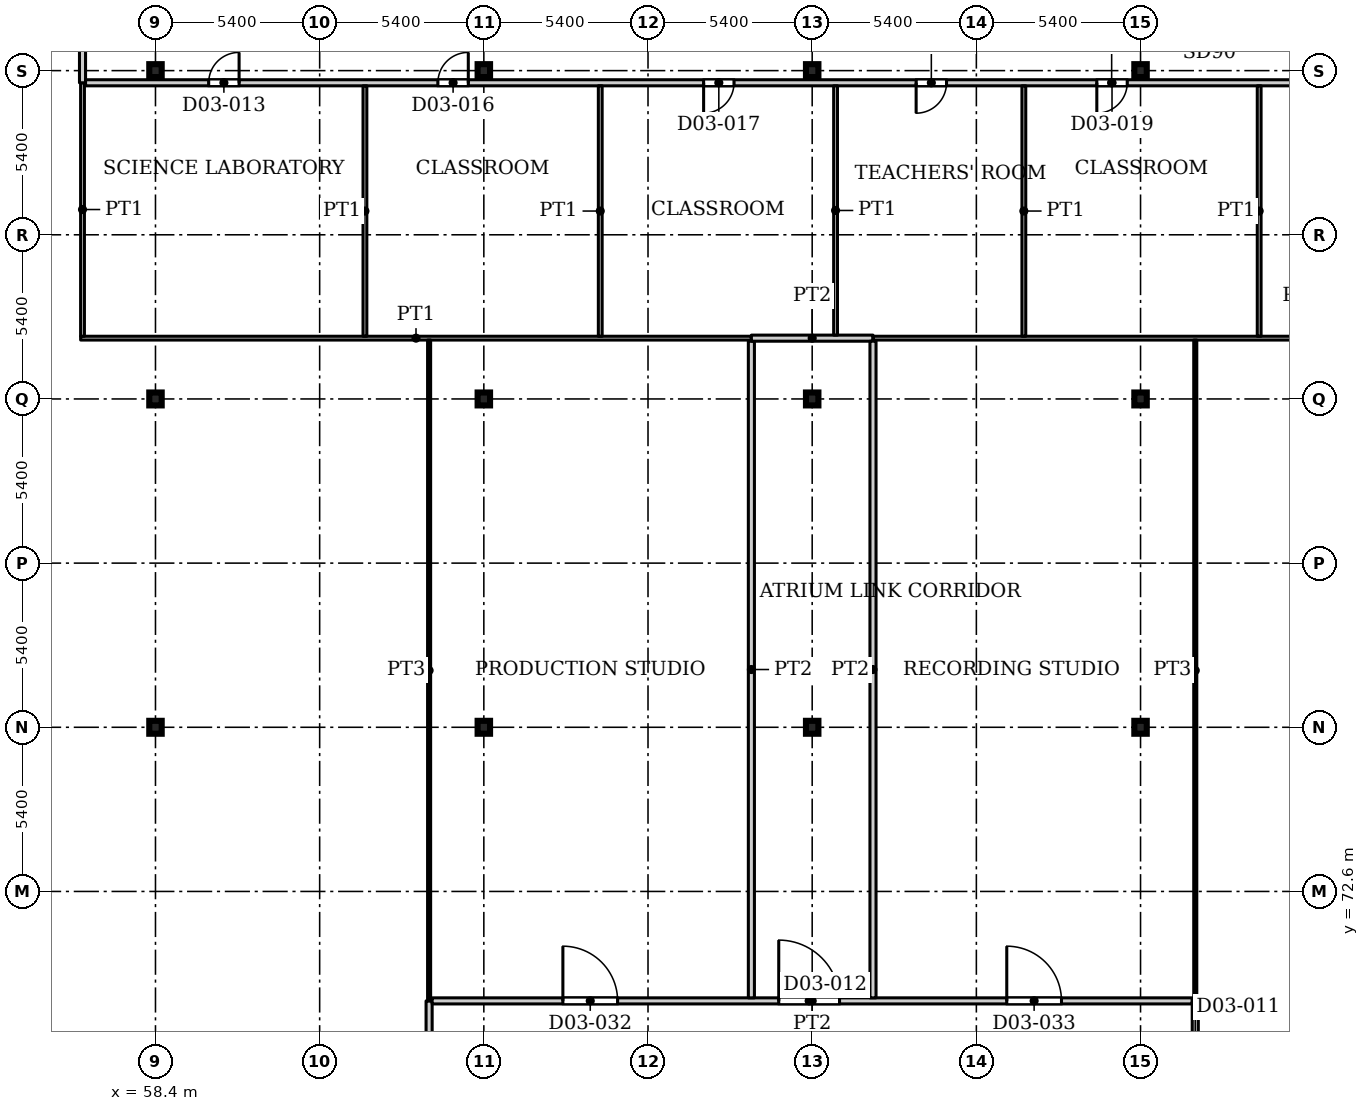
"""IFC4 building model, lengths in metres.
Left out: names, types, materials, properties, quantities, classifications, styles, units other than length and angle.
Written with IfcOpenShell. Run it as: python <this file> out.ifc"""

import sys

from ifc_helpers import new_model, si_unit, direction, frame, frame_2d, origin, origin_2d, place, context, subcontext, project, spatial, rectangle, i_section, extrude, source, transform, mapped, element, fill, save


model = new_model("IFC4")
c1 = context("Model", 3, precision=1e-05, world=origin(), true_north=direction((0.0, 1.0)))
c2 = subcontext(c1, "Body", "Model", "MODEL_VIEW")
j1 = project(units=[si_unit("LENGTHUNIT", "METRE"), si_unit("PLANEANGLEUNIT", "RADIAN")], contexts=[c1])
p1 = place(None, origin())
s1 = spatial("IfcSite", under=j1, at=p1, CompositionType="ELEMENT")
p2 = place(p1, origin())
s2 = spatial("IfcBuilding", under=s1, at=p2, CompositionType="ELEMENT")
p3 = place(p2, frame((0.0, 0.0, 17.0)))
s3 = spatial("IfcBuildingStorey", under=s2, at=p3, CompositionType="ELEMENT", Elevation=17.0)
for number, where, z_axis, x_axis in (
    (1, (58.4, 78.0, 0.0), (0.0, 0.0, 1.0), (1.0, 0.0, 0.0)),
    (2, (69.2, 78.0, 0.0), (0.0, 0.0, 1.0), (1.0, 0.0, 0.0)),
    (3, (80.0, 78.0, 0.0), (0.0, 0.0, 1.0), (1.0, 0.0, 0.0)),
    (4, (90.8, 78.0, 0.0), (0.0, 0.0, 1.0), (1.0, 0.0, 0.0)),
    (5, (58.4, 88.8, 0.0), (0.0, 0.0, 1.0), (1.0, 0.0, 0.0)),
    (6, (69.2, 88.8, 0.0), (0.0, 0.0, 1.0), (1.0, 0.0, 0.0)),
    (7, (80.0, 88.8, 0.0), (0.0, 0.0, 1.0), (1.0, 0.0, 0.0)),
    (8, (90.8, 88.8, 0.0), (0.0, 0.0, 1.0), (1.0, 0.0, 0.0)),
    (9, (58.4, 99.6, 0.0), (0.0, 0.0, 1.0), (1.0, 0.0, 0.0)),
    (10, (69.2, 99.6, 0.0), (0.0, 0.0, 1.0), (1.0, 0.0, 0.0)),
    (11, (80.0, 99.6, 0.0), (0.0, 0.0, 1.0), (1.0, 0.0, 0.0)),
    (12, (90.8, 99.6, 0.0), (0.0, 0.0, 1.0), (1.0, 0.0, 0.0)),
):
    element("IfcColumn", number, at=place(p3, frame(where, z_axis=z_axis, x_axis=x_axis)), inside=s3, PredefinedType="COLUMN", context=c2, shape_type="SweptSolid", body=[
        extrude(i_section(OverallWidth=0.409, OverallDepth=0.425, WebThickness=0.033, FlangeThickness=0.052, FilletRadius=0.013, at=origin_2d()), origin(), (0.0, 0.0, 1.0), 4.5),
    ])
p4 = place(p3, frame((55.938, 90.8, 0.0), z_axis=(0.0, 0.0, 1.0), x_axis=(1.0, 0.0, 0.0)))
e13 = element("IfcWall", 13, at=p4, inside=s3, PredefinedType="PARTITIONING", context=c2, shape_type="SweptSolid", body=[
    extrude(rectangle(XDim=22.062, YDim=0.125, at=frame_2d((11.031, 0.0))), origin(), (0.0, 0.0, 1.0), 4.18),
])
p5 = place(p3, frame((56.0, 90.862, 0.0), z_axis=(0.0, 0.0, 1.0), x_axis=(0.0, 1.0, 0.0)))
e14 = element("IfcWall", 14, at=p5, inside=s3, PredefinedType="PARTITIONING", context=c2, shape_type="SweptSolid", body=[
    extrude(rectangle(XDim=8.338, YDim=0.125, at=frame_2d((4.169, 0.0))), origin(), (0.0, 0.0, 1.0), 4.18),
])
p6 = place(p3, frame((56.0, 99.2, 0.0), z_axis=(0.0, 0.0, 1.0), x_axis=(0.0, 1.0, 0.0)))
e15 = element("IfcWall", 15, at=p6, inside=s3, PredefinedType="PARTITIONING", context=c2, shape_type="SweptSolid", body=[
    extrude(rectangle(XDim=2.4, YDim=0.2, at=frame_2d((1.2, 0.0))), origin(), (0.0, 0.0, 1.0), 4.18),
])
p7 = place(p3, frame((56.1, 99.2, 0.0), z_axis=(0.0, 0.0, 1.0), x_axis=(1.0, 0.0, 0.0)))
e16 = element("IfcWall", 16, at=p7, inside=s3, PredefinedType="PARTITIONING", context=c2, shape_type="SweptSolid", body=[
    extrude(rectangle(XDim=67.5, YDim=0.2, at=frame_2d((33.75, 0.0))), origin(), (0.0, 0.0, 1.0), 4.18),
])
p8 = place(p7, frame((4.05, 0.0, 0.0)))
e17 = element("IfcOpeningElement", 17, at=p8, cuts=e16, PredefinedType="OPENING", context=c2, shape_type="SweptSolid", body=[
    extrude(rectangle(XDim=1.0, YDim=2.1, at=frame_2d((0.5, 1.05))), frame((0.0, 0.11, 0.0), z_axis=(0.0, -1.0, 0.0), x_axis=(1.0, 0.0, 0.0)), (0.0, 0.0, 1.0), 0.22),
])
p9 = place(p7, frame((65.554, 0.0, 0.0)))
e18 = element("IfcOpeningElement", 18, at=p9, cuts=e16, PredefinedType="OPENING", context=c2, shape_type="SweptSolid", body=[
    extrude(rectangle(XDim=1.0, YDim=2.1, at=frame_2d((0.5, 1.05))), frame((0.0, 0.11, 0.0), z_axis=(0.0, -1.0, 0.0), x_axis=(1.0, 0.0, 0.0)), (0.0, 0.0, 1.0), 0.22),
])
p10 = place(p7, frame((11.589, 0.0, 0.0)))
e19 = element("IfcOpeningElement", 19, at=p10, cuts=e16, PredefinedType="OPENING", context=c2, shape_type="SweptSolid", body=[
    extrude(rectangle(XDim=1.0, YDim=2.1, at=frame_2d((0.5, 1.05))), frame((0.0, 0.11, 0.0), z_axis=(0.0, -1.0, 0.0), x_axis=(1.0, 0.0, 0.0)), (0.0, 0.0, 1.0), 0.22),
])
p11 = place(p7, frame((20.329, 0.0, 0.0)))
e20 = element("IfcOpeningElement", 20, at=p11, cuts=e16, PredefinedType="OPENING", context=c2, shape_type="SweptSolid", body=[
    extrude(rectangle(XDim=1.0, YDim=2.1, at=frame_2d((0.5, 1.05))), frame((0.0, 0.11, 0.0), z_axis=(0.0, -1.0, 0.0), x_axis=(1.0, 0.0, 0.0)), (0.0, 0.0, 1.0), 0.22),
])
p12 = place(p7, frame((27.319, 0.0, 0.0)))
e21 = element("IfcOpeningElement", 21, at=p12, cuts=e16, PredefinedType="OPENING", context=c2, shape_type="SweptSolid", body=[
    extrude(rectangle(XDim=1.0, YDim=2.1, at=frame_2d((0.5, 1.05))), frame((0.0, 0.11, 0.0), z_axis=(0.0, -1.0, 0.0), x_axis=(1.0, 0.0, 0.0)), (0.0, 0.0, 1.0), 0.22),
])
p13 = place(p7, frame((33.262, 0.0, 0.0)))
e22 = element("IfcOpeningElement", 22, at=p13, cuts=e16, PredefinedType="OPENING", context=c2, shape_type="SweptSolid", body=[
    extrude(rectangle(XDim=1.0, YDim=2.1, at=frame_2d((0.5, 1.05))), frame((0.0, 0.11, 0.0), z_axis=(0.0, -1.0, 0.0), x_axis=(1.0, 0.0, 0.0)), (0.0, 0.0, 1.0), 0.22),
])
p14 = place(p7, frame((42.002, 0.0, 0.0)))
e23 = element("IfcOpeningElement", 23, at=p14, cuts=e16, PredefinedType="OPENING", context=c2, shape_type="SweptSolid", body=[
    extrude(rectangle(XDim=1.0, YDim=2.1, at=frame_2d((0.5, 1.05))), frame((0.0, 0.11, 0.0), z_axis=(0.0, -1.0, 0.0), x_axis=(1.0, 0.0, 0.0)), (0.0, 0.0, 1.0), 0.22),
])
p15 = place(p7, frame((49.743, 0.0, 0.0)))
e24 = element("IfcOpeningElement", 24, at=p15, cuts=e16, PredefinedType="OPENING", context=c2, shape_type="SweptSolid", body=[
    extrude(rectangle(XDim=1.0, YDim=2.1, at=frame_2d((0.5, 1.05))), frame((0.0, 0.11, 0.0), z_axis=(0.0, -1.0, 0.0), x_axis=(1.0, 0.0, 0.0)), (0.0, 0.0, 1.0), 0.22),
])
p16 = place(p7, frame((56.733, 0.0, 0.0)))
e25 = element("IfcOpeningElement", 25, at=p16, cuts=e16, PredefinedType="OPENING", context=c2, shape_type="SweptSolid", body=[
    extrude(rectangle(XDim=1.0, YDim=2.1, at=frame_2d((0.5, 1.05))), frame((0.0, 0.11, 0.0), z_axis=(0.0, -1.0, 0.0), x_axis=(1.0, 0.0, 0.0)), (0.0, 0.0, 1.0), 0.22),
])
p17 = place(p7, frame((61.394, 0.0, 0.0)))
e26 = element("IfcOpeningElement", 26, at=p17, cuts=e16, PredefinedType="OPENING", context=c2, shape_type="SweptSolid", body=[
    extrude(rectangle(XDim=1.0, YDim=2.1, at=frame_2d((0.5, 1.05))), frame((0.0, 0.11, 0.0), z_axis=(0.0, -1.0, 0.0), x_axis=(1.0, 0.0, 0.0)), (0.0, 0.0, 1.0), 0.22),
])
p18 = place(p3, frame((65.289, 90.862, 0.0), z_axis=(0.0, 0.0, 1.0), x_axis=(0.0, 1.0, 0.0)))
e27 = element("IfcWall", 27, at=p18, inside=s3, PredefinedType="PARTITIONING", context=c2, shape_type="SweptSolid", body=[
    extrude(rectangle(XDim=8.238, YDim=0.125, at=frame_2d((4.119, 0.0))), origin(), (0.0, 0.0, 1.0), 4.18),
])
p19 = place(p3, frame((67.4, 43.8, 0.0), z_axis=(0.0, 0.0, 1.0), x_axis=(0.0, 1.0, 0.0)))
e28 = element("IfcWall", 28, at=p19, inside=s3, PredefinedType="PARTITIONING", context=c2, shape_type="SweptSolid", body=[
    extrude(rectangle(XDim=25.2, YDim=0.2, at=frame_2d((12.6, 0.0))), origin(), (0.0, 0.0, 1.0), 4.18),
])
p20 = place(p19, frame((7.25, 0.0, 0.0)))
e29 = element("IfcOpeningElement", 29, at=p20, cuts=e28, PredefinedType="OPENING", context=c2, shape_type="SweptSolid", body=[
    extrude(rectangle(XDim=1.8, YDim=2.1, at=frame_2d((0.9, 1.05))), frame((0.0, 0.11, 0.0), z_axis=(0.0, -1.0, 0.0), x_axis=(1.0, 0.0, 0.0)), (0.0, 0.0, 1.0), 0.22),
])
p21 = place(p19, frame((19.75, 0.0, 0.0)))
e30 = element("IfcOpeningElement", 30, at=p21, cuts=e28, PredefinedType="OPENING", context=c2, shape_type="SweptSolid", body=[
    extrude(rectangle(XDim=1.8, YDim=2.1, at=frame_2d((0.9, 1.05))), frame((0.0, 0.11, 0.0), z_axis=(0.0, -1.0, 0.0), x_axis=(1.0, 0.0, 0.0)), (0.0, 0.0, 1.0), 0.22),
])
p22 = place(p3, frame((67.4, 69.0, 0.0), z_axis=(0.0, 0.0, 1.0), x_axis=(0.0, 1.0, 0.0)))
e31 = element("IfcWall", 31, at=p22, inside=s3, PredefinedType="PARTITIONING", context=c2, shape_type="SweptSolid", body=[
    extrude(rectangle(XDim=21.738, YDim=0.1, at=frame_2d((10.869, 0.0))), origin(), (0.0, 0.0, 1.0), 4.18),
])
p23 = place(p3, frame((67.5, 69.0, 0.0), z_axis=(0.0, 0.0, 1.0), x_axis=(1.0, 0.0, 0.0)))
e32 = element("IfcWall", 32, at=p23, inside=s3, PredefinedType="PARTITIONING", context=c2, shape_type="SweptSolid", body=[
    extrude(rectangle(XDim=25.0, YDim=0.2, at=frame_2d((12.5, 0.0))), origin(), (0.0, 0.0, 1.0), 4.18),
])
p24 = place(p23, frame((11.4, 0.0, 0.0)))
e33 = element("IfcOpeningElement", 33, at=p24, cuts=e32, PredefinedType="OPENING", context=c2, shape_type="SweptSolid", body=[
    extrude(rectangle(XDim=2.0, YDim=2.1, at=frame_2d((1.0, 1.05))), frame((0.0, 0.11, 0.0), z_axis=(0.0, -1.0, 0.0), x_axis=(1.0, 0.0, 0.0)), (0.0, 0.0, 1.0), 0.22),
])
p25 = place(p23, frame((4.3, 0.0, 0.0)))
e34 = element("IfcOpeningElement", 34, at=p25, cuts=e32, PredefinedType="OPENING", context=c2, shape_type="SweptSolid", body=[
    extrude(rectangle(XDim=1.8, YDim=2.1, at=frame_2d((0.9, 1.05))), frame((0.0, 0.11, 0.0), z_axis=(0.0, -1.0, 0.0), x_axis=(1.0, 0.0, 0.0)), (0.0, 0.0, 1.0), 0.22),
])
p26 = place(p23, frame((18.9, 0.0, 0.0)))
e35 = element("IfcOpeningElement", 35, at=p26, cuts=e32, PredefinedType="OPENING", context=c2, shape_type="SweptSolid", body=[
    extrude(rectangle(XDim=1.8, YDim=2.1, at=frame_2d((0.9, 1.05))), frame((0.0, 0.11, 0.0), z_axis=(0.0, -1.0, 0.0), x_axis=(1.0, 0.0, 0.0)), (0.0, 0.0, 1.0), 0.22),
])
p27 = place(p3, frame((73.029, 90.862, 0.0), z_axis=(0.0, 0.0, 1.0), x_axis=(0.0, 1.0, 0.0)))
e36 = element("IfcWall", 36, at=p27, inside=s3, PredefinedType="PARTITIONING", context=c2, shape_type="SweptSolid", body=[
    extrude(rectangle(XDim=8.238, YDim=0.125, at=frame_2d((4.119, 0.0))), origin(), (0.0, 0.0, 1.0), 4.18),
])
p28 = place(p3, frame((78.0, 69.1, 0.0), z_axis=(0.0, 0.0, 1.0), x_axis=(0.0, 1.0, 0.0)))
e37 = element("IfcWall", 37, at=p28, inside=s3, PredefinedType="PARTITIONING", context=c2, shape_type="SweptSolid", body=[
    extrude(rectangle(XDim=21.6, YDim=0.2, at=frame_2d((10.8, 0.0))), origin(), (0.0, 0.0, 1.0), 4.18),
])
p29 = place(p3, frame((78.0, 90.8, 0.0), z_axis=(0.0, 0.0, 1.0), x_axis=(1.0, 0.0, 0.0)))
e38 = element("IfcWall", 38, at=p29, inside=s3, PredefinedType="PARTITIONING", context=c2, shape_type="SweptSolid", body=[
    extrude(rectangle(XDim=4.0, YDim=0.2, at=frame_2d((2.0, 0.0))), origin(), (0.0, 0.0, 1.0), 4.18),
])
p30 = place(p3, frame((80.769, 90.9, 0.0), z_axis=(0.0, 0.0, 1.0), x_axis=(0.0, 1.0, 0.0)))
e39 = element("IfcWall", 39, at=p30, inside=s3, PredefinedType="PARTITIONING", context=c2, shape_type="SweptSolid", body=[
    extrude(rectangle(XDim=8.2, YDim=0.125, at=frame_2d((4.1, 0.0))), origin(), (0.0, 0.0, 1.0), 4.18),
])
p31 = place(p3, frame((82.0, 69.1, 0.0), z_axis=(0.0, 0.0, 1.0), x_axis=(0.0, 1.0, 0.0)))
e40 = element("IfcWall", 40, at=p31, inside=s3, PredefinedType="PARTITIONING", context=c2, shape_type="SweptSolid", body=[
    extrude(rectangle(XDim=21.6, YDim=0.2, at=frame_2d((10.8, 0.0))), origin(), (0.0, 0.0, 1.0), 4.18),
])
p32 = place(p3, frame((82.0, 90.8, 0.0), z_axis=(0.0, 0.0, 1.0), x_axis=(1.0, 0.0, 0.0)))
e41 = element("IfcWall", 41, at=p32, inside=s3, PredefinedType="PARTITIONING", context=c2, shape_type="SweptSolid", body=[
    extrude(rectangle(XDim=28.183, YDim=0.125, at=frame_2d((14.092, 0.0))), origin(), (0.0, 0.0, 1.0), 4.18),
])
p33 = place(p3, frame((86.962, 90.862, 0.0), z_axis=(0.0, 0.0, 1.0), x_axis=(0.0, 1.0, 0.0)))
e42 = element("IfcWall", 42, at=p33, inside=s3, PredefinedType="PARTITIONING", context=c2, shape_type="SweptSolid", body=[
    extrude(rectangle(XDim=8.238, YDim=0.125, at=frame_2d((4.119, 0.0))), origin(), (0.0, 0.0, 1.0), 4.18),
])
p34 = place(p3, frame((92.6, 48.1, 0.0), z_axis=(0.0, 0.0, 1.0), x_axis=(0.0, 1.0, 0.0)))
e43 = element("IfcWall", 43, at=p34, inside=s3, PredefinedType="PARTITIONING", context=c2, shape_type="SweptSolid", body=[
    extrude(rectangle(XDim=20.9, YDim=0.2, at=frame_2d((10.45, 0.0))), origin(), (0.0, 0.0, 1.0), 4.18),
])
p35 = place(p34, frame((8.05, 0.0, 0.0)))
e44 = element("IfcOpeningElement", 44, at=p35, cuts=e43, PredefinedType="OPENING", context=c2, shape_type="SweptSolid", body=[
    extrude(rectangle(XDim=1.8, YDim=2.1, at=frame_2d((0.9, 1.05))), frame((0.0, 0.11, 0.0), z_axis=(0.0, -1.0, 0.0), x_axis=(1.0, 0.0, 0.0)), (0.0, 0.0, 1.0), 0.22),
])
p36 = place(p34, frame((18.8, 0.0, 0.0)))
e45 = element("IfcOpeningElement", 45, at=p36, cuts=e43, PredefinedType="OPENING", context=c2, shape_type="SweptSolid", body=[
    extrude(rectangle(XDim=1.0, YDim=2.1, at=frame_2d((0.5, 1.05))), frame((0.0, 0.11, 0.0), z_axis=(0.0, -1.0, 0.0), x_axis=(1.0, 0.0, 0.0)), (0.0, 0.0, 1.0), 0.22),
])
p37 = place(p3, frame((92.6, 69.0, 0.0), z_axis=(0.0, 0.0, 1.0), x_axis=(0.0, 1.0, 0.0)))
e46 = element("IfcWall", 46, at=p37, inside=s3, PredefinedType="PARTITIONING", context=c2, shape_type="SweptSolid", body=[
    extrude(rectangle(XDim=21.738, YDim=0.1, at=frame_2d((10.869, 0.0))), origin(), (0.0, 0.0, 1.0), 4.18),
])
p38 = place(p3, frame((94.702, 90.862, 0.0), z_axis=(0.0, 0.0, 1.0), x_axis=(0.0, 1.0, 0.0)))
e47 = element("IfcWall", 47, at=p38, inside=s3, PredefinedType="PARTITIONING", context=c2, shape_type="SweptSolid", body=[
    extrude(rectangle(XDim=8.238, YDim=0.125, at=frame_2d((4.119, 0.0))), origin(), (0.0, 0.0, 1.0), 4.18),
])
m1 = source(origin(), c2, "Body", "SweptSolid", [
    extrude(rectangle(XDim=2.0, YDim=2.1, at=frame_2d((1.0, 1.05))), frame((0.0, 0.025, 0.0), z_axis=(0.0, -1.0, 0.0), x_axis=(1.0, 0.0, 0.0)), (0.0, 0.0, 1.0), 0.05),
])
p39 = place(p24, origin())
e48 = element("IfcDoor", 48, at=p39, inside=s3, OperationType="DOUBLE_DOOR_SINGLE_SWING", PredefinedType="DOOR", context=c2, shape_type="MappedRepresentation", body=[
    mapped(m1, transform((0.0, 0.0, 0.0), x_axis=(1.0, 0.0, 0.0), y_axis=(0.0, 1.0, 0.0), z_axis=(0.0, 0.0, 1.0), scale=1.0)),
])
fill(e33, e48)
m2 = source(origin(), c2, "Body", "SweptSolid", [
    extrude(rectangle(XDim=1.0, YDim=2.1, at=frame_2d((0.5, 1.05))), frame((0.0, 0.025, 0.0), z_axis=(0.0, -1.0, 0.0), x_axis=(1.0, 0.0, 0.0)), (0.0, 0.0, 1.0), 0.05),
])
p40 = place(p8, origin())
e49 = element("IfcDoor", 49, at=p40, inside=s3, OperationType="SINGLE_SWING_LEFT", PredefinedType="DOOR", context=c2, shape_type="MappedRepresentation", body=[
    mapped(m2, transform((0.0, 0.0, 0.0), x_axis=(1.0, 0.0, 0.0), y_axis=(0.0, 1.0, 0.0), z_axis=(0.0, 0.0, 1.0), scale=1.0)),
])
fill(e17, e49)
p41 = place(p10, origin())
e50 = element("IfcDoor", 50, at=p41, inside=s3, OperationType="SINGLE_SWING_LEFT", PredefinedType="DOOR", context=c2, shape_type="MappedRepresentation", body=[
    mapped(m2, transform((0.0, 0.0, 0.0), x_axis=(1.0, 0.0, 0.0), y_axis=(0.0, 1.0, 0.0), z_axis=(0.0, 0.0, 1.0), scale=1.0)),
])
fill(e19, e50)
p42 = place(p11, origin())
e51 = element("IfcDoor", 51, at=p42, inside=s3, OperationType="SINGLE_SWING_RIGHT", PredefinedType="DOOR", context=c2, shape_type="MappedRepresentation", body=[
    mapped(m2, transform((0.0, 0.0, 0.0), x_axis=(1.0, 0.0, 0.0), y_axis=(0.0, 1.0, 0.0), z_axis=(0.0, 0.0, 1.0), scale=1.0)),
])
fill(e20, e51)
p43 = place(p12, origin())
e52 = element("IfcDoor", 52, at=p43, inside=s3, OperationType="SINGLE_SWING_RIGHT", PredefinedType="DOOR", context=c2, shape_type="MappedRepresentation", body=[
    mapped(m2, transform((0.0, 0.0, 0.0), x_axis=(1.0, 0.0, 0.0), y_axis=(0.0, 1.0, 0.0), z_axis=(0.0, 0.0, 1.0), scale=1.0)),
])
fill(e21, e52)
p44 = place(p13, origin())
e53 = element("IfcDoor", 53, at=p44, inside=s3, OperationType="SINGLE_SWING_RIGHT", PredefinedType="DOOR", context=c2, shape_type="MappedRepresentation", body=[
    mapped(m2, transform((0.0, 0.0, 0.0), x_axis=(1.0, 0.0, 0.0), y_axis=(0.0, 1.0, 0.0), z_axis=(0.0, 0.0, 1.0), scale=1.0)),
])
fill(e22, e53)
m3 = source(origin(), c2, "Body", "SweptSolid", [
    extrude(rectangle(XDim=1.8, YDim=2.1, at=frame_2d((0.9, 1.05))), frame((0.0, 0.025, 0.0), z_axis=(0.0, -1.0, 0.0), x_axis=(1.0, 0.0, 0.0)), (0.0, 0.0, 1.0), 0.05),
])
p45 = place(p25, origin())
e54 = element("IfcDoor", 54, at=p45, inside=s3, OperationType="DOUBLE_DOOR_SINGLE_SWING", PredefinedType="DOOR", context=c2, shape_type="MappedRepresentation", body=[
    mapped(m3, transform((0.0, 0.0, 0.0), x_axis=(1.0, 0.0, 0.0), y_axis=(0.0, 1.0, 0.0), z_axis=(0.0, 0.0, 1.0), scale=1.0)),
])
fill(e34, e54)
p46 = place(p26, origin())
e55 = element("IfcDoor", 55, at=p46, inside=s3, OperationType="DOUBLE_DOOR_SINGLE_SWING", PredefinedType="DOOR", context=c2, shape_type="MappedRepresentation", body=[
    mapped(m3, transform((0.0, 0.0, 0.0), x_axis=(1.0, 0.0, 0.0), y_axis=(0.0, 1.0, 0.0), z_axis=(0.0, 0.0, 1.0), scale=1.0)),
])
fill(e35, e55)
save(model, sys.argv[1])
